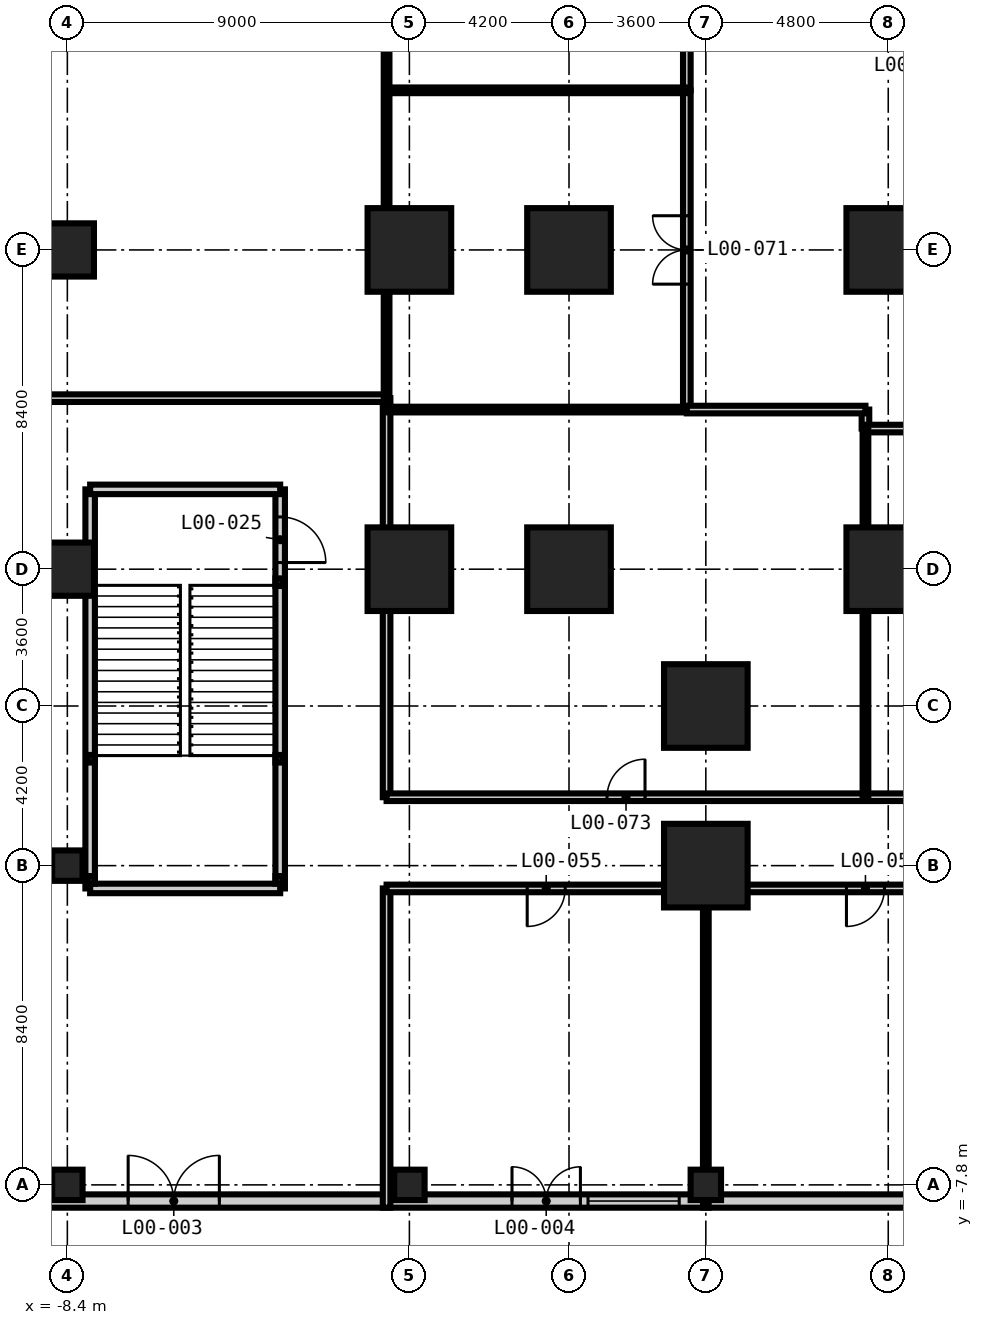
"""IFC4 building model, lengths in metres.
Left out: names, types, materials, properties, quantities, classifications, styles, units other than length and angle.
Written with IfcOpenShell. Run it as: python <this file> out.ifc"""

import sys

from ifc_helpers import new_model, si_unit, direction, frame, frame_2d, origin, origin_with_axes, origin_2d, place, context, subcontext, project, spatial, rectangle, hollow_rectangle, extrude, element, fill, save


model = new_model("IFC4")
c1 = context("Model", 3, precision=1e-05, world=origin(), true_north=direction((0.0, 1.0)))
c2 = subcontext(c1, "Body", "Model", "MODEL_VIEW")
j1 = project(units=[si_unit("LENGTHUNIT", "METRE"), si_unit("PLANEANGLEUNIT", "RADIAN")], contexts=[c1])
p1 = place(None, origin())
s1 = spatial("IfcSite", under=j1, at=p1, CompositionType="ELEMENT")
p2 = place(p1, origin())
s2 = spatial("IfcBuilding", under=s1, at=p2, CompositionType="ELEMENT")
p3 = place(p2, origin())
s3 = spatial("IfcBuildingStorey", under=s2, at=p3, CompositionType="ELEMENT", Elevation=0.0)
for number, where, z_axis, x_axis in (
    (1, (0.6, 8.4, -0.3), (0.0, 0.0, 1.0), (1.0, 0.0, 0.0)),
    (2, (0.6, 16.8, -0.3), (0.0, 0.0, 1.0), (1.0, 0.0, 0.0)),
    (3, (4.8, 8.4, -0.3), (0.0, 0.0, 1.0), (1.0, 0.0, 0.0)),
    (4, (4.8, 16.8, -0.3), (0.0, 0.0, 1.0), (1.0, 0.0, 0.0)),
    (5, (8.4, 0.6, -0.3), (0.0, 0.0, 1.0), (1.0, 0.0, 0.0)),
    (6, (8.4, 4.8, -0.3), (0.0, 0.0, 1.0), (1.0, 0.0, 0.0)),
    (7, (13.2, 8.4, -0.3), (0.0, 0.0, 1.0), (1.0, 0.0, 0.0)),
    (8, (13.2, 16.8, -0.3), (0.0, 0.0, 1.0), (1.0, 0.0, 0.0)),
):
    element("IfcColumn", number, at=place(p3, frame(where, z_axis=z_axis, x_axis=x_axis)), inside=s3, PredefinedType="COLUMN", context=c2, shape_type="SweptSolid", body=[
        extrude(rectangle(XDim=2.2, YDim=2.2, at=origin_2d()), origin(), (0.0, 0.0, 1.0), 6.0),
    ])
for number, where, z_axis, x_axis in (
    (9, (-8.4, -7.8, -0.3), (0.0, 0.0, 1.0), (1.0, 0.0, 0.0)),
    (10, (-8.4, 0.6, -0.3), (0.0, 0.0, 1.0), (1.0, 0.0, 0.0)),
):
    element("IfcColumn", number, at=place(p3, frame(where, z_axis=z_axis, x_axis=x_axis)), inside=s3, PredefinedType="COLUMN", context=c2, shape_type="SweptSolid", body=[
        extrude(rectangle(XDim=0.8, YDim=0.8, at=origin_2d()), origin(), (0.0, 0.0, 1.0), 6.0),
    ])
for number, where, z_axis, x_axis in (
    (11, (-8.4, 8.4, -0.3), (0.0, 0.0, 1.0), (1.0, 0.0, 0.0)),
    (12, (-8.4, 16.8, -0.3), (0.0, 0.0, 1.0), (1.0, 0.0, 0.0)),
):
    element("IfcColumn", number, at=place(p3, frame(where, z_axis=z_axis, x_axis=x_axis)), inside=s3, PredefinedType="COLUMN", context=c2, shape_type="SweptSolid", body=[
        extrude(rectangle(XDim=1.4, YDim=1.4, at=origin_2d()), origin(), (0.0, 0.0, 1.0), 6.0),
    ])
for number, where, z_axis, x_axis in (
    (13, (0.6, -7.8, -0.3), (0.0, 0.0, 1.0), (1.0, 0.0, 0.0)),
    (14, (8.4, -7.8, -0.3), (0.0, 0.0, 1.0), (1.0, 0.0, 0.0)),
):
    element("IfcColumn", number, at=place(p3, frame(where, z_axis=z_axis, x_axis=x_axis)), inside=s3, PredefinedType="COLUMN", context=c2, shape_type="SweptSolid", body=[
        extrude(rectangle(XDim=0.8, YDim=0.8, at=origin_2d()), origin(), (0.0, 0.0, 1.0), 6.0),
    ])
p4 = place(p3, frame((-33.6, -8.225, 0.0), z_axis=(0.0, 0.0, 1.0), x_axis=(1.0, 0.0, 0.0)))
e15 = element("IfcWall", 15, at=p4, inside=s3, PredefinedType="SOLIDWALL", context=c2, shape_type="SweptSolid", body=[
    extrude(rectangle(XDim=92.4, YDim=0.35, at=frame_2d((46.2, 0.0))), origin(), (0.0, 0.0, 1.0), 5.7),
])
p5 = place(p4, frame((5.4, 0.0, 0.0)))
e16 = element("IfcOpeningElement", 16, at=p5, cuts=e15, PredefinedType="OPENING", context=c2, shape_type="SweptSolid", body=[
    extrude(rectangle(XDim=1.8, YDim=2.7, at=frame_2d((0.9, 1.35))), frame((0.0, 0.185, 0.0), z_axis=(0.0, -1.0, 0.0), x_axis=(1.0, 0.0, 0.0)), (0.0, 0.0, 1.0), 0.37),
])
p6 = place(p4, frame((2.8, 0.0, 0.9)))
e17 = element("IfcOpeningElement", 17, at=p6, cuts=e15, PredefinedType="OPENING", context=c2, shape_type="SweptSolid", body=[
    extrude(rectangle(XDim=2.4, YDim=2.4, at=frame_2d((1.2, 1.2))), frame((0.0, 0.185, 0.0), z_axis=(0.0, -1.0, 0.0), x_axis=(1.0, 0.0, 0.0)), (0.0, 0.0, 1.0), 0.37),
])
p7 = place(p4, frame((9.3, 0.0, 0.9)))
e18 = element("IfcOpeningElement", 18, at=p7, cuts=e15, PredefinedType="OPENING", context=c2, shape_type="SweptSolid", body=[
    extrude(rectangle(XDim=2.4, YDim=2.4, at=frame_2d((1.2, 1.2))), frame((0.0, 0.185, 0.0), z_axis=(0.0, -1.0, 0.0), x_axis=(1.0, 0.0, 0.0)), (0.0, 0.0, 1.0), 0.37),
])
p8 = place(p4, frame((13.8, 0.0, 0.9)))
e19 = element("IfcOpeningElement", 19, at=p8, cuts=e15, PredefinedType="OPENING", context=c2, shape_type="SweptSolid", body=[
    extrude(rectangle(XDim=2.4, YDim=2.4, at=frame_2d((1.2, 1.2))), frame((0.0, 0.185, 0.0), z_axis=(0.0, -1.0, 0.0), x_axis=(1.0, 0.0, 0.0)), (0.0, 0.0, 1.0), 0.37),
])
p9 = place(p4, frame((19.3, 0.0, 0.0)))
e20 = element("IfcOpeningElement", 20, at=p9, cuts=e15, PredefinedType="OPENING", context=c2, shape_type="SweptSolid", body=[
    extrude(rectangle(XDim=1.2, YDim=2.4, at=frame_2d((0.6, 1.2))), frame((0.0, 0.185, 0.0), z_axis=(0.0, -1.0, 0.0), x_axis=(1.0, 0.0, 0.0)), (0.0, 0.0, 1.0), 0.37),
])
p10 = place(p4, frame((26.8, 0.0, 0.0)))
e21 = element("IfcOpeningElement", 21, at=p10, cuts=e15, PredefinedType="OPENING", context=c2, shape_type="SweptSolid", body=[
    extrude(rectangle(XDim=2.4, YDim=3.0, at=frame_2d((1.2, 1.5))), frame((0.0, 0.185, 0.0), z_axis=(0.0, -1.0, 0.0), x_axis=(1.0, 0.0, 0.0)), (0.0, 0.0, 1.0), 0.37),
])
p11 = place(p4, frame((36.9, 0.0, 0.0)))
e22 = element("IfcOpeningElement", 22, at=p11, cuts=e15, PredefinedType="OPENING", context=c2, shape_type="SweptSolid", body=[
    extrude(rectangle(XDim=1.8, YDim=2.4, at=frame_2d((0.9, 1.2))), frame((0.0, 0.185, 0.0), z_axis=(0.0, -1.0, 0.0), x_axis=(1.0, 0.0, 0.0)), (0.0, 0.0, 1.0), 0.37),
])
p12 = place(p4, frame((38.9, 0.0, 0.9)))
e23 = element("IfcOpeningElement", 23, at=p12, cuts=e15, PredefinedType="OPENING", context=c2, shape_type="SweptSolid", body=[
    extrude(rectangle(XDim=2.4, YDim=2.4, at=frame_2d((1.2, 1.2))), frame((0.0, 0.185, 0.0), z_axis=(0.0, -1.0, 0.0), x_axis=(1.0, 0.0, 0.0)), (0.0, 0.0, 1.0), 0.37),
])
p13 = place(p4, frame((53.7, 0.0, 0.0)))
e24 = element("IfcOpeningElement", 24, at=p13, cuts=e15, PredefinedType="OPENING", context=c2, shape_type="SweptSolid", body=[
    extrude(rectangle(XDim=1.8, YDim=2.4, at=frame_2d((0.9, 1.2))), frame((0.0, 0.185, 0.0), z_axis=(0.0, -1.0, 0.0), x_axis=(1.0, 0.0, 0.0)), (0.0, 0.0, 1.0), 0.37),
])
p14 = place(p4, frame((51.1, 0.0, 0.9)))
e25 = element("IfcOpeningElement", 25, at=p14, cuts=e15, PredefinedType="OPENING", context=c2, shape_type="SweptSolid", body=[
    extrude(rectangle(XDim=2.4, YDim=2.4, at=frame_2d((1.2, 1.2))), frame((0.0, 0.185, 0.0), z_axis=(0.0, -1.0, 0.0), x_axis=(1.0, 0.0, 0.0)), (0.0, 0.0, 1.0), 0.37),
])
p15 = place(p4, frame((61.8, 0.0, 0.0)))
e26 = element("IfcOpeningElement", 26, at=p15, cuts=e15, PredefinedType="OPENING", context=c2, shape_type="SweptSolid", body=[
    extrude(rectangle(XDim=2.4, YDim=3.0, at=frame_2d((1.2, 1.5))), frame((0.0, 0.185, 0.0), z_axis=(0.0, -1.0, 0.0), x_axis=(1.0, 0.0, 0.0)), (0.0, 0.0, 1.0), 0.37),
])
p16 = place(p4, frame((72.7, 0.0, 0.9)))
e27 = element("IfcOpeningElement", 27, at=p16, cuts=e15, PredefinedType="OPENING", context=c2, shape_type="SweptSolid", body=[
    extrude(rectangle(XDim=2.4, YDim=2.4, at=frame_2d((1.2, 1.2))), frame((0.0, 0.185, 0.0), z_axis=(0.0, -1.0, 0.0), x_axis=(1.0, 0.0, 0.0)), (0.0, 0.0, 1.0), 0.37),
])
p17 = place(p4, frame((81.1, 0.0, 0.9)))
e28 = element("IfcOpeningElement", 28, at=p17, cuts=e15, PredefinedType="OPENING", context=c2, shape_type="SweptSolid", body=[
    extrude(rectangle(XDim=2.4, YDim=2.4, at=frame_2d((1.2, 1.2))), frame((0.0, 0.185, 0.0), z_axis=(0.0, -1.0, 0.0), x_axis=(1.0, 0.0, 0.0)), (0.0, 0.0, 1.0), 0.37),
])
p18 = place(p4, frame((88.9, 0.0, 0.9)))
e29 = element("IfcOpeningElement", 29, at=p18, cuts=e15, PredefinedType="OPENING", context=c2, shape_type="SweptSolid", body=[
    extrude(rectangle(XDim=2.4, YDim=2.4, at=frame_2d((1.2, 1.2))), frame((0.0, 0.185, 0.0), z_axis=(0.0, -1.0, 0.0), x_axis=(1.0, 0.0, 0.0)), (0.0, 0.0, 1.0), 0.37),
])
p19 = place(p3, frame((0.0, -8.4, 0.0), z_axis=(0.0, 0.0, 1.0), x_axis=(0.0, 1.0, 0.0)))
e30 = element("IfcWall", 30, at=p19, inside=s3, PredefinedType="PARTITIONING", context=c2, shape_type="SweptSolid", body=[
    extrude(rectangle(XDim=8.4, YDim=0.2, at=frame_2d((4.2, 0.0))), origin(), (0.0, 0.0, 1.0), 5.7),
])
p20 = place(p3, frame((0.0, 2.4, 0.0), z_axis=(0.0, 0.0, 1.0), x_axis=(0.0, 1.0, 0.0)))
e31 = element("IfcWall", 31, at=p20, inside=s3, PredefinedType="PARTITIONING", context=c2, shape_type="SweptSolid", body=[
    extrude(rectangle(XDim=10.5, YDim=0.2, at=frame_2d((5.25, 0.0))), origin(), (0.0, 0.0, 1.0), 5.7),
])
p21 = place(p3, frame((7.9, 12.6, 0.0), z_axis=(0.0, 0.0, 1.0), x_axis=(0.0, 1.0, 0.0)))
e32 = element("IfcWall", 32, at=p21, inside=s3, PredefinedType="PARTITIONING", context=c2, shape_type="SweptSolid", body=[
    extrude(rectangle(XDim=8.4, YDim=0.2, at=frame_2d((4.2, 0.0))), origin(), (0.0, 0.0, 1.0), 5.7),
])
p22 = place(p21, frame((3.3, 0.0, 0.0)))
e33 = element("IfcOpeningElement", 33, at=p22, cuts=e32, PredefinedType="OPENING", context=c2, shape_type="SweptSolid", body=[
    extrude(rectangle(XDim=1.8, YDim=2.4, at=frame_2d((0.9, 1.2))), frame((0.0, 0.11, 0.0), z_axis=(0.0, -1.0, 0.0), x_axis=(1.0, 0.0, 0.0)), (0.0, 0.0, 1.0), 0.22),
])
p23 = place(p3, frame((12.6, 12.1, 0.0), z_axis=(0.0, 0.0, 1.0), x_axis=(0.0, 1.0, 0.0)))
e34 = element("IfcWall", 34, at=p23, inside=s3, PredefinedType="PARTITIONING", context=c2, shape_type="SweptSolid", body=[
    extrude(rectangle(XDim=0.5, YDim=0.2, at=frame_2d((0.25, 0.0))), origin(), (0.0, 0.0, 1.0), 5.7),
])
p24 = place(p3, origin_with_axes())
e35 = element("IfcWall", 35, at=p24, inside=s3, PredefinedType="PARTITIONING", context=c2, shape_type="SweptSolid", body=[
    extrude(rectangle(XDim=25.2, YDim=0.2, at=frame_2d((12.6, 0.0))), origin(), (0.0, 0.0, 1.0), 5.7),
])
p25 = place(p24, frame((3.7, 0.0, 0.0)))
e36 = element("IfcOpeningElement", 36, at=p25, cuts=e35, PredefinedType="OPENING", context=c2, shape_type="SweptSolid", body=[
    extrude(rectangle(XDim=1.0, YDim=2.1, at=frame_2d((0.5, 1.05))), frame((0.0, 0.11, 0.0), z_axis=(0.0, -1.0, 0.0), x_axis=(1.0, 0.0, 0.0)), (0.0, 0.0, 1.0), 0.22),
])
p26 = place(p24, frame((12.1, 0.0, 0.0)))
e37 = element("IfcOpeningElement", 37, at=p26, cuts=e35, PredefinedType="OPENING", context=c2, shape_type="SweptSolid", body=[
    extrude(rectangle(XDim=1.0, YDim=2.1, at=frame_2d((0.5, 1.05))), frame((0.0, 0.11, 0.0), z_axis=(0.0, -1.0, 0.0), x_axis=(1.0, 0.0, 0.0)), (0.0, 0.0, 1.0), 0.22),
])
p27 = place(p3, frame((0.0, 2.4, 0.0), z_axis=(0.0, 0.0, 1.0), x_axis=(1.0, 0.0, 0.0)))
e38 = element("IfcWall", 38, at=p27, inside=s3, PredefinedType="PARTITIONING", context=c2, shape_type="SweptSolid", body=[
    extrude(rectangle(XDim=54.6, YDim=0.2, at=frame_2d((27.3, 0.0))), origin(), (0.0, 0.0, 1.0), 5.7),
])
p28 = place(p27, frame((5.8, 0.0, 0.0)))
e39 = element("IfcOpeningElement", 39, at=p28, cuts=e38, PredefinedType="OPENING", context=c2, shape_type="SweptSolid", body=[
    extrude(rectangle(XDim=1.0, YDim=2.1, at=frame_2d((0.5, 1.05))), frame((0.0, 0.11, 0.0), z_axis=(0.0, -1.0, 0.0), x_axis=(1.0, 0.0, 0.0)), (0.0, 0.0, 1.0), 0.22),
])
p29 = place(p27, frame((18.4, 0.0, 0.0)))
e40 = element("IfcOpeningElement", 40, at=p29, cuts=e38, PredefinedType="OPENING", context=c2, shape_type="SweptSolid", body=[
    extrude(rectangle(XDim=1.0, YDim=2.1, at=frame_2d((0.5, 1.05))), frame((0.0, 0.11, 0.0), z_axis=(0.0, -1.0, 0.0), x_axis=(1.0, 0.0, 0.0)), (0.0, 0.0, 1.0), 0.22),
])
p30 = place(p27, frame((28.9, 0.0, 0.0)))
e41 = element("IfcOpeningElement", 41, at=p30, cuts=e38, PredefinedType="OPENING", context=c2, shape_type="SweptSolid", body=[
    extrude(rectangle(XDim=1.0, YDim=2.1, at=frame_2d((0.5, 1.05))), frame((0.0, 0.11, 0.0), z_axis=(0.0, -1.0, 0.0), x_axis=(1.0, 0.0, 0.0)), (0.0, 0.0, 1.0), 0.22),
])
p31 = place(p27, frame((37.3, 0.0, 0.0)))
e42 = element("IfcOpeningElement", 42, at=p31, cuts=e38, PredefinedType="OPENING", context=c2, shape_type="SweptSolid", body=[
    extrude(rectangle(XDim=1.0, YDim=2.1, at=frame_2d((0.5, 1.05))), frame((0.0, 0.11, 0.0), z_axis=(0.0, -1.0, 0.0), x_axis=(1.0, 0.0, 0.0)), (0.0, 0.0, 1.0), 0.22),
])
p32 = place(p3, frame((12.6, 12.1, 0.0), z_axis=(0.0, 0.0, 1.0), x_axis=(1.0, 0.0, 0.0)))
e43 = element("IfcWall", 43, at=p32, inside=s3, PredefinedType="PARTITIONING", context=c2, shape_type="SweptSolid", body=[
    extrude(rectangle(XDim=33.6, YDim=0.2, at=frame_2d((16.8, 0.0))), origin(), (0.0, 0.0, 1.0), 5.7),
])
p33 = place(p3, frame((7.9, 12.6, 0.0), z_axis=(0.0, 0.0, 1.0), x_axis=(1.0, 0.0, 0.0)))
e44 = element("IfcWall", 44, at=p33, inside=s3, PredefinedType="PARTITIONING", context=c2, shape_type="SweptSolid", body=[
    extrude(rectangle(XDim=4.7, YDim=0.2, at=frame_2d((2.35, 0.0))), origin(), (0.0, 0.0, 1.0), 5.7),
])
p34 = place(p3, frame((7.9, 42.0, 0.0), z_axis=(0.0, 0.0, 1.0), x_axis=(0.0, -1.0, 0.0)))
e45 = element("IfcWall", 45, at=p34, inside=s3, PredefinedType="PARTITIONING", context=c2, shape_type="SweptSolid", body=[
    extrude(rectangle(XDim=21.0, YDim=0.2, at=frame_2d((10.5, 0.0))), origin(), (0.0, 0.0, 1.0), 5.7),
])
p35 = place(p34, frame((9.6, 0.0, 0.0)))
e46 = element("IfcOpeningElement", 46, at=p35, cuts=e45, PredefinedType="OPENING", context=c2, shape_type="SweptSolid", body=[
    extrude(rectangle(XDim=1.8, YDim=2.4, at=frame_2d((0.9, 1.2))), frame((0.0, 0.11, 0.0), z_axis=(0.0, -1.0, 0.0), x_axis=(1.0, 0.0, 0.0)), (0.0, 0.0, 1.0), 0.22),
])
p36 = place(p3, frame((0.0, 12.9, 0.0), z_axis=(0.0, 0.0, 1.0), x_axis=(-1.0, 0.0, 0.0)))
e47 = element("IfcWall", 47, at=p36, inside=s3, PredefinedType="PARTITIONING", context=c2, shape_type="SweptSolid", body=[
    extrude(rectangle(XDim=11.2, YDim=0.2, at=frame_2d((5.6, 0.0))), origin(), (0.0, 0.0, 1.0), 5.7),
])
p37 = place(p3, frame((0.0, 12.9, 0.0), z_axis=(0.0, 0.0, 1.0), x_axis=(0.0, 1.0, 0.0)))
e48 = element("IfcWall", 48, at=p37, inside=s3, PredefinedType="PARTITIONING", context=c2, shape_type="SweptSolid", body=[
    extrude(rectangle(XDim=33.0, YDim=0.15, at=frame_2d((16.5, 0.0))), origin(), (0.0, 0.0, 1.0), 5.7),
])
p38 = place(p3, frame((8.4, -8.4, 0.0), z_axis=(0.0, 0.0, 1.0), x_axis=(0.0, 1.0, 0.0)))
e49 = element("IfcWall", 49, at=p38, inside=s3, PredefinedType="PARTITIONING", context=c2, shape_type="SweptSolid", body=[
    extrude(rectangle(XDim=8.4, YDim=0.15, at=frame_2d((4.2, 0.0))), origin(), (0.0, 0.0, 1.0), 5.7),
])
p39 = place(p3, frame((12.6, 2.4, 0.0), z_axis=(0.0, 0.0, 1.0), x_axis=(0.0, 1.0, 0.0)))
e50 = element("IfcWall", 50, at=p39, inside=s3, PredefinedType="PARTITIONING", context=c2, shape_type="SweptSolid", body=[
    extrude(rectangle(XDim=9.7, YDim=0.15, at=frame_2d((4.85, 0.0))), origin(), (0.0, 0.0, 1.0), 5.7),
])
for number, where, z_axis, x_axis in (
    (51, (0.0, 12.6, 0.0), (0.0, 0.0, 1.0), (1.0, 0.0, 0.0)),
    (52, (0.0, 21.0, 0.0), (0.0, 0.0, 1.0), (1.0, 0.0, 0.0)),
):
    element("IfcWall", number, at=place(p3, frame(where, z_axis=z_axis, x_axis=x_axis)), inside=s3, PredefinedType="PARTITIONING", context=c2, shape_type="SweptSolid", body=[
        extrude(rectangle(XDim=7.9, YDim=0.15, at=frame_2d((3.95, 0.0))), origin(), (0.0, 0.0, 1.0), 5.7),
    ])
p40 = place(p3, frame((-7.8, 0.0, 0.0), z_axis=(0.0, 0.0, 1.0), x_axis=(0.0, 1.0, 0.0)))
e53 = element("IfcWall", 53, at=p40, inside=s3, PredefinedType="PARTITIONING", context=c2, shape_type="SweptSolid", body=[
    extrude(rectangle(XDim=10.5, YDim=0.25, at=frame_2d((5.25, 0.0))), origin(), (0.0, 0.0, 1.0), 5.7),
])
p41 = place(p3, frame((-2.8, 0.0, 0.0), z_axis=(0.0, 0.0, 1.0), x_axis=(0.0, 1.0, 0.0)))
e54 = element("IfcWall", 54, at=p41, inside=s3, PredefinedType="PARTITIONING", context=c2, shape_type="SweptSolid", body=[
    extrude(rectangle(XDim=10.5, YDim=0.25, at=frame_2d((5.25, 0.0))), origin(), (0.0, 0.0, 1.0), 5.7),
])
p42 = place(p41, frame((8.575, 0.0, 0.0)))
e55 = element("IfcOpeningElement", 55, at=p42, cuts=e54, PredefinedType="OPENING", context=c2, shape_type="SweptSolid", body=[
    extrude(rectangle(XDim=1.2, YDim=2.2, at=frame_2d((0.6, 1.1))), frame((0.0, 0.135, 0.0), z_axis=(0.0, -1.0, 0.0), x_axis=(1.0, 0.0, 0.0)), (0.0, 0.0, 1.0), 0.27),
])
for number, where, z_axis, x_axis in (
    (56, (-7.8, 0.0, 0.0), (0.0, 0.0, 1.0), (1.0, 0.0, 0.0)),
    (57, (-7.8, 10.5, 0.0), (0.0, 0.0, 1.0), (1.0, 0.0, 0.0)),
):
    element("IfcWall", number, at=place(p3, frame(where, z_axis=z_axis, x_axis=x_axis)), inside=s3, PredefinedType="PARTITIONING", context=c2, shape_type="SweptSolid", body=[
        extrude(rectangle(XDim=5.0, YDim=0.25, at=frame_2d((2.5, 0.0))), origin(), (0.0, 0.0, 1.0), 5.7),
    ])
for number, where, z_axis, x_axis in (
    (58, (-2.825, 8.058, -0.3), (0.0, 0.0, 1.0), (1.0, 0.0, 0.0)),
    (59, (-7.775, 3.413, -0.3), (0.0, 0.0, 1.0), (1.0, 0.0, 0.0)),
    (60, (-2.825, 3.413, -0.3), (0.0, 0.0, 1.0), (1.0, 0.0, 0.0)),
    (61, (-7.775, 0.225, -0.3), (0.0, 0.0, 1.0), (1.0, 0.0, 0.0)),
    (62, (-2.825, 0.225, -0.3), (0.0, 0.0, 1.0), (1.0, 0.0, 0.0)),
):
    element("IfcColumn", number, at=place(p3, frame(where, z_axis=z_axis, x_axis=x_axis)), inside=s3, PredefinedType="COLUMN", context=c2, shape_type="SweptSolid", body=[
        extrude(hollow_rectangle(XDim=0.2, YDim=0.2, WallThickness=0.01, at=origin_2d()), origin(), (0.0, 0.0, 1.0), 6.0),
    ])
p43 = place(p10, origin())
e63 = element("IfcDoor", 63, at=p43, inside=s3, OperationType="DOUBLE_DOOR_DOUBLE_SWING", PredefinedType="DOOR", context=c2, shape_type="SweptSolid", body=[
    extrude(rectangle(XDim=2.4, YDim=3.0, at=frame_2d((1.2, 1.5))), frame((0.0, 0.025, 0.0), z_axis=(0.0, -1.0, 0.0), x_axis=(1.0, 0.0, 0.0)), (0.0, 0.0, 1.0), 0.05),
])
fill(e21, e63)
p44 = place(p11, origin())
e64 = element("IfcDoor", 64, at=p44, inside=s3, OperationType="DOUBLE_DOOR_DOUBLE_SWING", PredefinedType="DOOR", context=c2, shape_type="SweptSolid", body=[
    extrude(rectangle(XDim=1.8, YDim=2.4, at=frame_2d((0.9, 1.2))), frame((0.0, 0.025, 0.0), z_axis=(0.0, -1.0, 0.0), x_axis=(1.0, 0.0, 0.0)), (0.0, 0.0, 1.0), 0.05),
])
fill(e22, e64)
p45 = place(p12, origin())
e65 = element("IfcWindow", 65, at=p45, inside=s3, PartitioningType="SINGLE_PANEL", PredefinedType="WINDOW", context=c2, shape_type="SweptSolid", body=[
    extrude(rectangle(XDim=2.4, YDim=2.4, at=frame_2d((1.2, 1.2))), frame((0.0, 0.03, 0.0), z_axis=(0.0, -1.0, 0.0), x_axis=(1.0, 0.0, 0.0)), (0.0, 0.0, 1.0), 0.06),
])
fill(e23, e65)
p46 = place(p42, frame((1.2, 0.0, 0.0), z_axis=(0.0, 0.0, 1.0), x_axis=(-1.0, 0.0, 0.0)))
e66 = element("IfcDoor", 66, at=p46, inside=s3, OperationType="SINGLE_SWING_RIGHT", PredefinedType="DOOR", context=c2, shape_type="SweptSolid", body=[
    extrude(rectangle(XDim=1.2, YDim=2.2, at=frame_2d((0.6, 1.1))), frame((0.0, 0.025, 0.0), z_axis=(0.0, -1.0, 0.0), x_axis=(1.0, 0.0, 0.0)), (0.0, 0.0, 1.0), 0.05),
])
fill(e55, e66)
p47 = place(p25, frame((1.0, 0.0, 0.0), z_axis=(0.0, 0.0, 1.0), x_axis=(-1.0, 0.0, 0.0)))
e67 = element("IfcDoor", 67, at=p47, inside=s3, OperationType="SINGLE_SWING_RIGHT", PredefinedType="DOOR", context=c2, shape_type="SweptSolid", body=[
    extrude(rectangle(XDim=1.0, YDim=2.1, at=frame_2d((0.5, 1.05))), frame((0.0, 0.025, 0.0), z_axis=(0.0, -1.0, 0.0), x_axis=(1.0, 0.0, 0.0)), (0.0, 0.0, 1.0), 0.05),
])
fill(e36, e67)
p48 = place(p26, frame((1.0, 0.0, 0.0), z_axis=(0.0, 0.0, 1.0), x_axis=(-1.0, 0.0, 0.0)))
e68 = element("IfcDoor", 68, at=p48, inside=s3, OperationType="SINGLE_SWING_RIGHT", PredefinedType="DOOR", context=c2, shape_type="SweptSolid", body=[
    extrude(rectangle(XDim=1.0, YDim=2.1, at=frame_2d((0.5, 1.05))), frame((0.0, 0.025, 0.0), z_axis=(0.0, -1.0, 0.0), x_axis=(1.0, 0.0, 0.0)), (0.0, 0.0, 1.0), 0.05),
])
fill(e37, e68)
p49 = place(p22, origin())
e69 = element("IfcDoor", 69, at=p49, inside=s3, OperationType="DOUBLE_DOOR_DOUBLE_SWING", PredefinedType="DOOR", context=c2, shape_type="SweptSolid", body=[
    extrude(rectangle(XDim=1.8, YDim=2.4, at=frame_2d((0.9, 1.2))), frame((0.0, 0.025, 0.0), z_axis=(0.0, -1.0, 0.0), x_axis=(1.0, 0.0, 0.0)), (0.0, 0.0, 1.0), 0.05),
])
fill(e33, e69)
p50 = place(p28, origin())
e70 = element("IfcDoor", 70, at=p50, inside=s3, OperationType="SINGLE_SWING_RIGHT", PredefinedType="DOOR", context=c2, shape_type="SweptSolid", body=[
    extrude(rectangle(XDim=1.0, YDim=2.1, at=frame_2d((0.5, 1.05))), frame((0.0, 0.025, 0.0), z_axis=(0.0, -1.0, 0.0), x_axis=(1.0, 0.0, 0.0)), (0.0, 0.0, 1.0), 0.05),
])
fill(e39, e70)
save(model, sys.argv[1])
